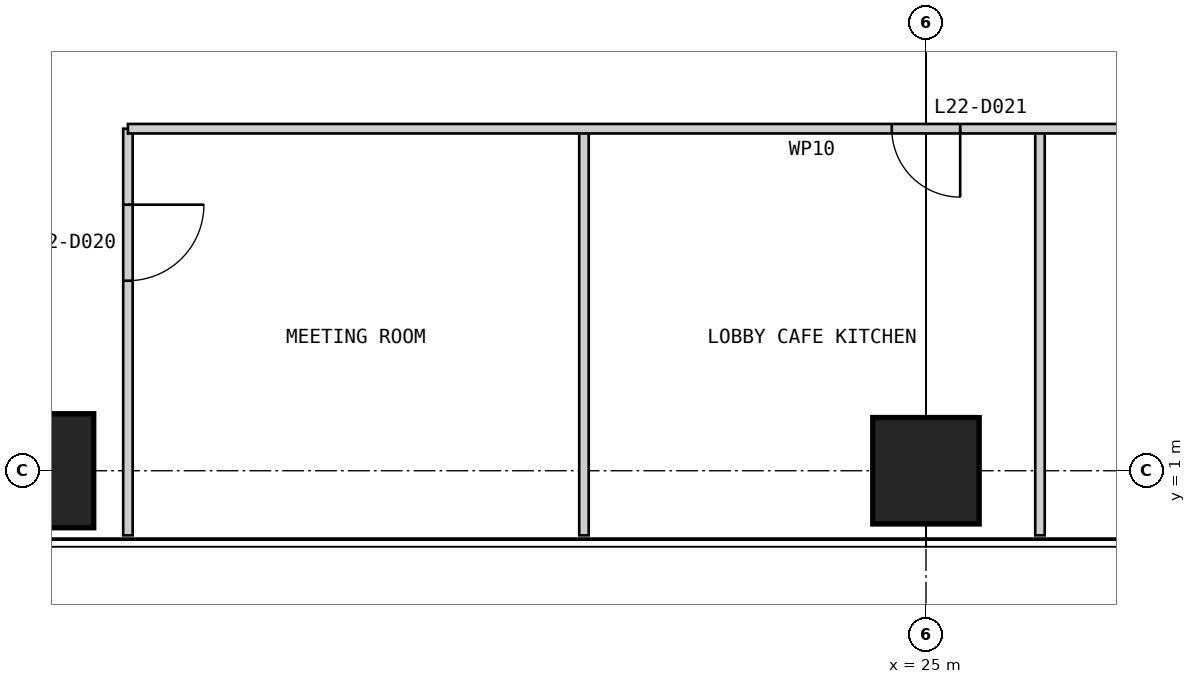
"""IFC4 building model, lengths in metres.
Left out: names, types, materials, properties, quantities, classifications, styles, units other than length and angle.
Written with IfcOpenShell. Run it as: python <this file> out.ifc"""

import sys

from ifc_helpers import new_model, si_unit, direction, frame, frame_2d, origin, origin_2d, place, context, subcontext, project, spatial, rectangle, extrude, element, fill, save


model = new_model("IFC4")
c1 = context("Model", 3, precision=1e-05, world=origin(), true_north=direction((0.0, 1.0)))
c2 = subcontext(c1, "Body", "Model", "MODEL_VIEW")
j1 = project(units=[si_unit("LENGTHUNIT", "METRE"), si_unit("PLANEANGLEUNIT", "RADIAN")], contexts=[c1])
p1 = place(None, origin())
s1 = spatial("IfcSite", under=j1, at=p1, CompositionType="ELEMENT")
p2 = place(p1, origin())
s2 = spatial("IfcBuilding", under=s1, at=p2, CompositionType="ELEMENT")
p3 = place(p2, frame((0.0, 0.0, 97.0)))
s3 = spatial("IfcBuildingStorey", under=s2, at=p3, CompositionType="ELEMENT", Elevation=97.0)
p4 = place(p3, frame((13.0, 1.0, 0.0), z_axis=(0.0, 0.0, 1.0), x_axis=(1.0, 0.0, 0.0)))
e1 = element("IfcColumn", 1, at=p4, inside=s3, PredefinedType="COLUMN", context=c2, shape_type="SweptSolid", body=[
    extrude(rectangle(XDim=2.1, YDim=1.5, at=origin_2d()), origin(), (0.0, 0.0, 1.0), 5.4),
])
p5 = place(p3, frame((25.0, 1.0, 0.0), z_axis=(0.0, 0.0, 1.0), x_axis=(1.0, 0.0, 0.0)))
e2 = element("IfcColumn", 2, at=p5, inside=s3, PredefinedType="COLUMN", context=c2, shape_type="SweptSolid", body=[
    extrude(rectangle(XDim=1.4, YDim=1.4, at=origin_2d()), origin(), (0.0, 0.0, 1.0), 5.4),
])
p6 = place(p3, frame((14.5, 0.15, 0.0), z_axis=(0.0, 0.0, 1.0), x_axis=(0.0, 1.0, 0.0)))
e3 = element("IfcWall", 3, at=p6, inside=s3, PredefinedType="PARTITIONING", context=c2, shape_type="SweptSolid", body=[
    extrude(rectangle(XDim=5.35, YDim=0.125, at=frame_2d((2.675, 0.0))), origin(), (0.0, 0.0, 1.0), 5.25),
])
p7 = place(p6, frame((3.35, 0.0, 0.0)))
e4 = element("IfcOpeningElement", 4, at=p7, cuts=e3, PredefinedType="OPENING", context=c2, shape_type="SweptSolid", body=[
    extrude(rectangle(XDim=1.0, YDim=2.2, at=frame_2d((0.5, 1.1))), frame((0.0, 0.073, 0.0), z_axis=(0.0, -1.0, 0.0), x_axis=(1.0, 0.0, 0.0)), (0.0, 0.0, 1.0), 0.145),
])
for number, where, z_axis, x_axis in (
    (5, (20.5, 0.15, 0.0), (0.0, 0.0, 1.0), (0.0, 1.0, 0.0)),
    (6, (26.5, 0.15, 0.0), (0.0, 0.0, 1.0), (0.0, 1.0, 0.0)),
):
    element("IfcWall", number, at=place(p3, frame(where, z_axis=z_axis, x_axis=x_axis)), inside=s3, PredefinedType="PARTITIONING", context=c2, shape_type="SweptSolid", body=[
        extrude(rectangle(XDim=5.35, YDim=0.125, at=frame_2d((2.675, 0.0))), origin(), (0.0, 0.0, 1.0), 5.25),
    ])
p8 = place(p3, frame((14.5, 5.5, 0.0), z_axis=(0.0, 0.0, 1.0), x_axis=(1.0, 0.0, 0.0)))
e7 = element("IfcWall", 7, at=p8, inside=s3, PredefinedType="PARTITIONING", context=c2, shape_type="SweptSolid", body=[
    extrude(rectangle(XDim=18.0, YDim=0.125, at=frame_2d((9.0, 0.0))), origin(), (0.0, 0.0, 1.0), 5.25),
])
p9 = place(p8, frame((10.05, 0.0, 0.0)))
e8 = element("IfcOpeningElement", 8, at=p9, cuts=e7, PredefinedType="OPENING", context=c2, shape_type="SweptSolid", body=[
    extrude(rectangle(XDim=0.9, YDim=2.2, at=frame_2d((0.45, 1.1))), frame((0.0, 0.073, 0.0), z_axis=(0.0, -1.0, 0.0), x_axis=(1.0, 0.0, 0.0)), (0.0, 0.0, 1.0), 0.145),
])
p10 = place(p7, frame((1.0, 0.0, 0.0), z_axis=(0.0, 0.0, 1.0), x_axis=(-1.0, 0.0, 0.0)))
e9 = element("IfcDoor", 9, at=p10, inside=s3, OperationType="SINGLE_SWING_LEFT", PredefinedType="DOOR", context=c2, shape_type="SweptSolid", body=[
    extrude(rectangle(XDim=1.0, YDim=2.2, at=frame_2d((0.5, 1.1))), frame((0.0, 0.025, 0.0), z_axis=(0.0, -1.0, 0.0), x_axis=(1.0, 0.0, 0.0)), (0.0, 0.0, 1.0), 0.05),
])
fill(e4, e9)
p11 = place(p9, frame((0.9, 0.0, 0.0), z_axis=(0.0, 0.0, 1.0), x_axis=(-1.0, 0.0, 0.0)))
e10 = element("IfcDoor", 10, at=p11, inside=s3, OperationType="SINGLE_SWING_LEFT", PredefinedType="DOOR", context=c2, shape_type="SweptSolid", body=[
    extrude(rectangle(XDim=0.9, YDim=2.2, at=frame_2d((0.45, 1.1))), frame((0.0, 0.025, 0.0), z_axis=(0.0, -1.0, 0.0), x_axis=(1.0, 0.0, 0.0)), (0.0, 0.0, 1.0), 0.05),
])
fill(e8, e10)
save(model, sys.argv[1])
